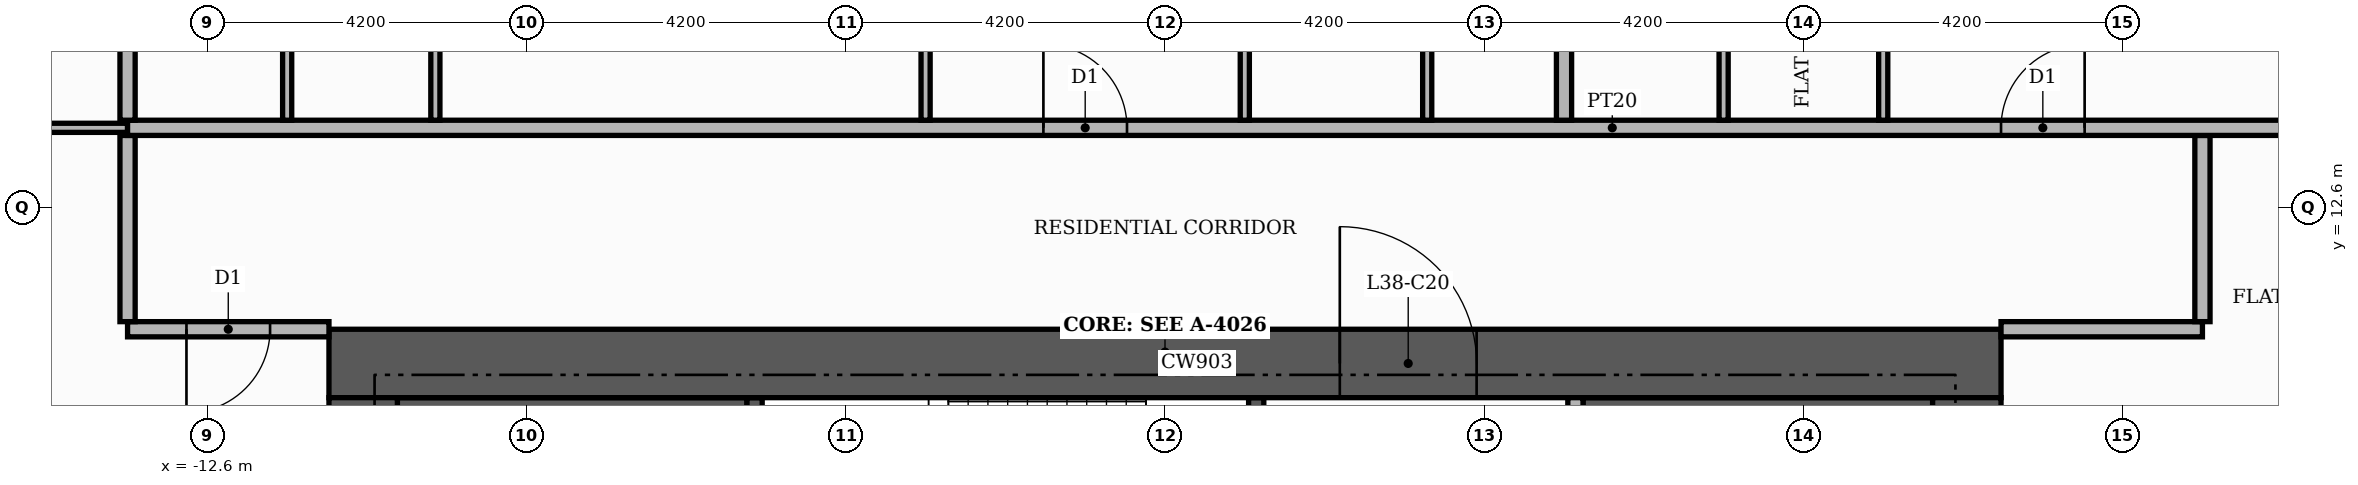
"""IFC4 building model, lengths in metres.
Left out: names, types, materials, properties, quantities, classifications, styles, units other than length and angle.
Written with IfcOpenShell. Run it as: python <this file> out.ifc"""

import sys

from ifc_helpers import new_model, si_unit, direction, frame, frame_2d, origin, place, context, subcontext, project, spatial, rectangle, extrude, element, fill, save


model = new_model("IFC4")
c1 = context("Model", 3, precision=1e-05, world=origin(), true_north=direction((0.0, 1.0)))
c2 = subcontext(c1, "Body", "Model", "MODEL_VIEW")
j1 = project(units=[si_unit("LENGTHUNIT", "METRE"), si_unit("PLANEANGLEUNIT", "RADIAN")], contexts=[c1])
p1 = place(None, origin())
s1 = spatial("IfcSite", under=j1, at=p1, CompositionType="ELEMENT")
p2 = place(p1, origin())
s2 = spatial("IfcBuilding", under=s1, at=p2, CompositionType="ELEMENT")
p3 = place(p2, frame((0.0, 0.0, 161.1)))
s3 = spatial("IfcBuildingStorey", under=s2, at=p3, CompositionType="ELEMENT", Elevation=161.1)
for number, where, z_axis, x_axis in (
    (1, (-10.1, 9.15, 0.0), (0.0, 0.0, 1.0), (1.0, 0.0, 0.0)),
    (2, (5.5, 9.15, 0.0), (0.0, 0.0, 1.0), (1.0, 0.0, 0.0)),
):
    element("IfcWall", number, at=place(p3, frame(where, z_axis=z_axis, x_axis=x_axis)), inside=s3, PredefinedType="SHEAR", context=c2, shape_type="SweptSolid", body=[
        extrude(rectangle(XDim=4.6, YDim=1.9, at=frame_2d((2.3, 0.0))), origin(), (0.0, 0.0, 1.0), 3.48),
    ])
p4 = place(p3, frame((-5.4, 7.25, 0.0), z_axis=(0.0, 0.0, 1.0), x_axis=(0.0, 1.0, 0.0)))
e3 = element("IfcWall", 3, at=p4, inside=s3, PredefinedType="SHEAR", context=c2, shape_type="SweptSolid", body=[
    extrude(rectangle(XDim=2.85, YDim=0.2, at=frame_2d((1.425, 0.0))), origin(), (0.0, 0.0, 1.0), 3.48),
])
p5 = place(p3, frame((1.2, 7.25, 0.0), z_axis=(0.0, 0.0, 1.0), x_axis=(0.0, 1.0, 0.0)))
e4 = element("IfcWall", 4, at=p5, inside=s3, PredefinedType="SHEAR", context=c2, shape_type="SweptSolid", body=[
    extrude(rectangle(XDim=2.85, YDim=0.2, at=frame_2d((1.425, 0.0))), origin(), (0.0, 0.0, 1.0), 3.48),
])
p6 = place(p5, frame((0.85, 0.0, 0.0)))
e5 = element("IfcOpeningElement", 5, at=p6, cuts=e4, PredefinedType="OPENING", context=c2, shape_type="SweptSolid", body=[
    extrude(rectangle(XDim=1.0, YDim=2.1, at=frame_2d((0.5, 1.05))), frame((0.0, 0.11, 0.0), z_axis=(0.0, -1.0, 0.0), x_axis=(1.0, 0.0, 0.0)), (0.0, 0.0, 1.0), 0.22),
])
p7 = place(p3, frame((-11.0, 10.55, 0.0), z_axis=(0.0, 0.0, 1.0), x_axis=(1.0, 0.0, 0.0)))
e6 = element("IfcWall", 6, at=p7, inside=s3, PredefinedType="SHEAR", context=c2, shape_type="SweptSolid", body=[
    extrude(rectangle(XDim=22.0, YDim=0.9, at=frame_2d((11.0, 0.0))), origin(), (0.0, 0.0, 1.0), 3.48),
])
p8 = place(p7, frame((13.3, 0.0, 0.0)))
e7 = element("IfcOpeningElement", 7, at=p8, cuts=e6, PredefinedType="OPENING", context=c2, shape_type="SweptSolid", body=[
    extrude(rectangle(XDim=1.8, YDim=2.2, at=frame_2d((0.9, 1.1))), frame((0.0, 0.46, 0.0), z_axis=(0.0, -1.0, 0.0), x_axis=(1.0, 0.0, 0.0)), (0.0, 0.0, 1.0), 0.92),
])
for number, where, z_axis, x_axis in (
    (8, (-10.55, -10.1, 0.0), (0.0, 0.0, 1.0), (0.0, 1.0, 0.0)),
    (9, (10.55, -10.1, 0.0), (0.0, 0.0, 1.0), (0.0, 1.0, 0.0)),
):
    element("IfcWall", number, at=place(p3, frame(where, z_axis=z_axis, x_axis=x_axis)), inside=s3, PredefinedType="SHEAR", context=c2, shape_type="SweptSolid", body=[
        extrude(rectangle(XDim=20.2, YDim=0.9, at=frame_2d((10.1, 0.0))), origin(), (0.0, 0.0, 1.0), 3.48),
    ])
p9 = place(p3, frame((5.4, 5.5, 0.0), z_axis=(0.0, 0.0, 1.0), x_axis=(0.0, 1.0, 0.0)))
e10 = element("IfcWall", 10, at=p9, inside=s3, PredefinedType="PARTITIONING", context=c2, shape_type="SweptSolid", body=[
    extrude(rectangle(XDim=4.6, YDim=0.2, at=frame_2d((2.3, 0.0))), origin(), (0.0, 0.0, 1.0), 3.48),
])
p10 = place(p9, frame((0.25, 0.0, 0.0)))
e11 = element("IfcOpeningElement", 11, at=p10, cuts=e10, PredefinedType="OPENING", context=c2, shape_type="SweptSolid", body=[
    extrude(rectangle(XDim=1.0, YDim=2.1, at=frame_2d((0.5, 1.05))), frame((0.0, 0.11, 0.0), z_axis=(0.0, -1.0, 0.0), x_axis=(1.0, 0.0, 0.0)), (0.0, 0.0, 1.0), 0.22),
])
p11 = place(p3, frame((-13.65, 11.0, 0.0), z_axis=(0.0, 0.0, 1.0), x_axis=(1.0, 0.0, 0.0)))
e12 = element("IfcWall", 12, at=p11, inside=s3, PredefinedType="PARTITIONING", context=c2, shape_type="SweptSolid", body=[
    extrude(rectangle(XDim=2.65, YDim=0.2, at=frame_2d((1.325, 0.0))), origin(), (0.0, 0.0, 1.0), 3.48),
])
p12 = place(p11, frame((0.775, 0.0, 0.0)))
e13 = element("IfcOpeningElement", 13, at=p12, cuts=e12, PredefinedType="OPENING", context=c2, shape_type="SweptSolid", body=[
    extrude(rectangle(XDim=1.1, YDim=2.4, at=frame_2d((0.55, 1.2))), frame((0.0, 0.11, 0.0), z_axis=(0.0, -1.0, 0.0), x_axis=(1.0, 0.0, 0.0)), (0.0, 0.0, 1.0), 0.22),
])
p13 = place(p3, frame((11.0, 11.0, 0.0), z_axis=(0.0, 0.0, 1.0), x_axis=(1.0, 0.0, 0.0)))
e14 = element("IfcWall", 14, at=p13, inside=s3, PredefinedType="PARTITIONING", context=c2, shape_type="SweptSolid", body=[
    extrude(rectangle(XDim=2.65, YDim=0.2, at=frame_2d((1.325, 0.0))), origin(), (0.0, 0.0, 1.0), 3.48),
])
for number, where, z_axis, x_axis in (
    (15, (-13.65, 11.1, 0.0), (0.0, 0.0, 1.0), (0.0, 1.0, 0.0)),
    (16, (13.65, 11.1, 0.0), (0.0, 0.0, 1.0), (0.0, 1.0, 0.0)),
):
    element("IfcWall", number, at=place(p3, frame(where, z_axis=z_axis, x_axis=x_axis)), inside=s3, PredefinedType="PARTITIONING", context=c2, shape_type="SweptSolid", body=[
        extrude(rectangle(XDim=2.45, YDim=0.2, at=frame_2d((1.225, 0.0))), origin(), (0.0, 0.0, 1.0), 3.48),
    ])
p14 = place(p3, frame((-19.82, 13.65, 0.0), z_axis=(0.0, 0.0, 1.0), x_axis=(1.0, 0.0, 0.0)))
e17 = element("IfcWall", 17, at=p14, inside=s3, PredefinedType="PARTITIONING", context=c2, shape_type="SweptSolid", body=[
    extrude(rectangle(XDim=6.17, YDim=0.12, at=frame_2d((3.085, 0.0))), origin(), (0.0, 0.0, 1.0), 3.48),
])
p15 = place(p14, frame((2.635, 0.0, 0.0)))
e18 = element("IfcOpeningElement", 18, at=p15, cuts=e17, PredefinedType="OPENING", context=c2, shape_type="SweptSolid", body=[
    extrude(rectangle(XDim=0.9, YDim=2.1, at=frame_2d((0.45, 1.05))), frame((0.0, 0.07, 0.0), z_axis=(0.0, -1.0, 0.0), x_axis=(1.0, 0.0, 0.0)), (0.0, 0.0, 1.0), 0.14),
])
p16 = place(p3, frame((-13.65, 13.65, 0.0), z_axis=(0.0, 0.0, 1.0), x_axis=(1.0, 0.0, 0.0)))
e19 = element("IfcWall", 19, at=p16, inside=s3, PredefinedType="PARTITIONING", context=c2, shape_type="SweptSolid", body=[
    extrude(rectangle(XDim=39.07, YDim=0.2, at=frame_2d((19.535, 0.0))), origin(), (0.0, 0.0, 1.0), 3.48),
])
p17 = place(p16, frame((24.65, 0.0, 0.0)))
e20 = element("IfcOpeningElement", 20, at=p17, cuts=e19, PredefinedType="OPENING", context=c2, shape_type="SweptSolid", body=[
    extrude(rectangle(XDim=1.1, YDim=2.4, at=frame_2d((0.55, 1.2))), frame((0.0, 0.11, 0.0), z_axis=(0.0, -1.0, 0.0), x_axis=(1.0, 0.0, 0.0)), (0.0, 0.0, 1.0), 0.22),
])
p18 = place(p16, frame((12.05, 0.0, 0.0)))
e21 = element("IfcOpeningElement", 21, at=p18, cuts=e19, PredefinedType="OPENING", context=c2, shape_type="SweptSolid", body=[
    extrude(rectangle(XDim=1.1, YDim=2.4, at=frame_2d((0.55, 1.2))), frame((0.0, 0.11, 0.0), z_axis=(0.0, -1.0, 0.0), x_axis=(1.0, 0.0, 0.0)), (0.0, 0.0, 1.0), 0.22),
])
p19 = place(p3, frame((-13.65, 13.75, 0.0), z_axis=(0.0, 0.0, 1.0), x_axis=(0.0, 1.0, 0.0)))
e22 = element("IfcWall", 22, at=p19, inside=s3, PredefinedType="PARTITIONING", context=c2, shape_type="SweptSolid", body=[
    extrude(rectangle(XDim=11.67, YDim=0.2, at=frame_2d((5.835, 0.0))), origin(), (0.0, 0.0, 1.0), 3.48),
])
for number, where, z_axis, x_axis in (
    (23, (-11.55, 13.75, 0.0), (0.0, 0.0, 1.0), (0.0, 1.0, 0.0)),
    (24, (-9.6, 13.75, 0.0), (0.0, 0.0, 1.0), (0.0, 1.0, 0.0)),
    (25, (-3.15, 13.75, 0.0), (0.0, 0.0, 1.0), (0.0, 1.0, 0.0)),
):
    element("IfcWall", number, at=place(p3, frame(where, z_axis=z_axis, x_axis=x_axis)), inside=s3, PredefinedType="PARTITIONING", context=c2, shape_type="SweptSolid", body=[
        extrude(rectangle(XDim=4.51, YDim=0.12, at=frame_2d((2.255, 0.0))), origin(), (0.0, 0.0, 1.0), 3.48),
    ])
p20 = place(p3, frame((1.05, 13.75, 0.0), z_axis=(0.0, 0.0, 1.0), x_axis=(0.0, 1.0, 0.0)))
e26 = element("IfcWall", 26, at=p20, inside=s3, PredefinedType="PARTITIONING", context=c2, shape_type="SweptSolid", body=[
    extrude(rectangle(XDim=4.51, YDim=0.12, at=frame_2d((2.255, 0.0))), origin(), (0.0, 0.0, 1.0), 3.48),
])
p21 = place(p20, frame((1.785, 0.0, 0.0)))
e27 = element("IfcOpeningElement", 27, at=p21, cuts=e26, PredefinedType="OPENING", context=c2, shape_type="SweptSolid", body=[
    extrude(rectangle(XDim=0.9, YDim=2.1, at=frame_2d((0.45, 1.05))), frame((0.0, 0.07, 0.0), z_axis=(0.0, -1.0, 0.0), x_axis=(1.0, 0.0, 0.0)), (0.0, 0.0, 1.0), 0.14),
])
p22 = place(p3, frame((3.45, 13.75, 0.0), z_axis=(0.0, 0.0, 1.0), x_axis=(0.0, 1.0, 0.0)))
e28 = element("IfcWall", 28, at=p22, inside=s3, PredefinedType="PARTITIONING", context=c2, shape_type="SweptSolid", body=[
    extrude(rectangle(XDim=4.51, YDim=0.12, at=frame_2d((2.255, 0.0))), origin(), (0.0, 0.0, 1.0), 3.48),
])
p23 = place(p3, frame((5.25, 13.75, 0.0), z_axis=(0.0, 0.0, 1.0), x_axis=(0.0, 1.0, 0.0)))
e29 = element("IfcWall", 29, at=p23, inside=s3, PredefinedType="PARTITIONING", context=c2, shape_type="SweptSolid", body=[
    extrude(rectangle(XDim=6.67, YDim=0.2, at=frame_2d((3.335, 0.0))), origin(), (0.0, 0.0, 1.0), 3.48),
])
p24 = place(p3, frame((7.35, 13.75, 0.0), z_axis=(0.0, 0.0, 1.0), x_axis=(0.0, 1.0, 0.0)))
e30 = element("IfcWall", 30, at=p24, inside=s3, PredefinedType="PARTITIONING", context=c2, shape_type="SweptSolid", body=[
    extrude(rectangle(XDim=4.51, YDim=0.12, at=frame_2d((2.255, 0.0))), origin(), (0.0, 0.0, 1.0), 3.48),
])
p25 = place(p3, frame((9.45, 13.75, 0.0), z_axis=(0.0, 0.0, 1.0), x_axis=(0.0, 1.0, 0.0)))
e31 = element("IfcWall", 31, at=p25, inside=s3, PredefinedType="PARTITIONING", context=c2, shape_type="SweptSolid", body=[
    extrude(rectangle(XDim=4.51, YDim=0.12, at=frame_2d((2.255, 0.0))), origin(), (0.0, 0.0, 1.0), 3.48),
])
p26 = place(p25, frame((1.785, 0.0, 0.0)))
e32 = element("IfcOpeningElement", 32, at=p26, cuts=e31, PredefinedType="OPENING", context=c2, shape_type="SweptSolid", body=[
    extrude(rectangle(XDim=0.9, YDim=2.1, at=frame_2d((0.45, 1.05))), frame((0.0, 0.07, 0.0), z_axis=(0.0, -1.0, 0.0), x_axis=(1.0, 0.0, 0.0)), (0.0, 0.0, 1.0), 0.14),
])
p27 = place(p8, origin())
e33 = element("IfcDoor", 33, at=p27, inside=s3, OperationType="DOUBLE_DOOR_SINGLE_SWING", PredefinedType="DOOR", context=c2, shape_type="SweptSolid", body=[
    extrude(rectangle(XDim=1.8, YDim=2.2, at=frame_2d((0.9, 1.1))), frame((0.0, 0.025, 0.0), z_axis=(0.0, -1.0, 0.0), x_axis=(1.0, 0.0, 0.0)), (0.0, 0.0, 1.0), 0.05),
])
fill(e7, e33)
p28 = place(p17, origin())
e34 = element("IfcDoor", 34, at=p28, inside=s3, OperationType="SINGLE_SWING_RIGHT", PredefinedType="DOOR", context=c2, shape_type="SweptSolid", body=[
    extrude(rectangle(XDim=1.1, YDim=2.4, at=frame_2d((0.55, 1.2))), frame((0.0, 0.025, 0.0), z_axis=(0.0, -1.0, 0.0), x_axis=(1.0, 0.0, 0.0)), (0.0, 0.0, 1.0), 0.05),
])
fill(e20, e34)
p29 = place(p18, origin())
e35 = element("IfcDoor", 35, at=p29, inside=s3, OperationType="SINGLE_SWING_LEFT", PredefinedType="DOOR", context=c2, shape_type="SweptSolid", body=[
    extrude(rectangle(XDim=1.1, YDim=2.4, at=frame_2d((0.55, 1.2))), frame((0.0, 0.025, 0.0), z_axis=(0.0, -1.0, 0.0), x_axis=(1.0, 0.0, 0.0)), (0.0, 0.0, 1.0), 0.05),
])
fill(e21, e35)
p30 = place(p12, frame((1.1, 0.0, 0.0), z_axis=(0.0, 0.0, 1.0), x_axis=(-1.0, 0.0, 0.0)))
e36 = element("IfcDoor", 36, at=p30, inside=s3, OperationType="SINGLE_SWING_LEFT", PredefinedType="DOOR", context=c2, shape_type="SweptSolid", body=[
    extrude(rectangle(XDim=1.1, YDim=2.4, at=frame_2d((0.55, 1.2))), frame((0.0, 0.025, 0.0), z_axis=(0.0, -1.0, 0.0), x_axis=(1.0, 0.0, 0.0)), (0.0, 0.0, 1.0), 0.05),
])
fill(e13, e36)
save(model, sys.argv[1])
